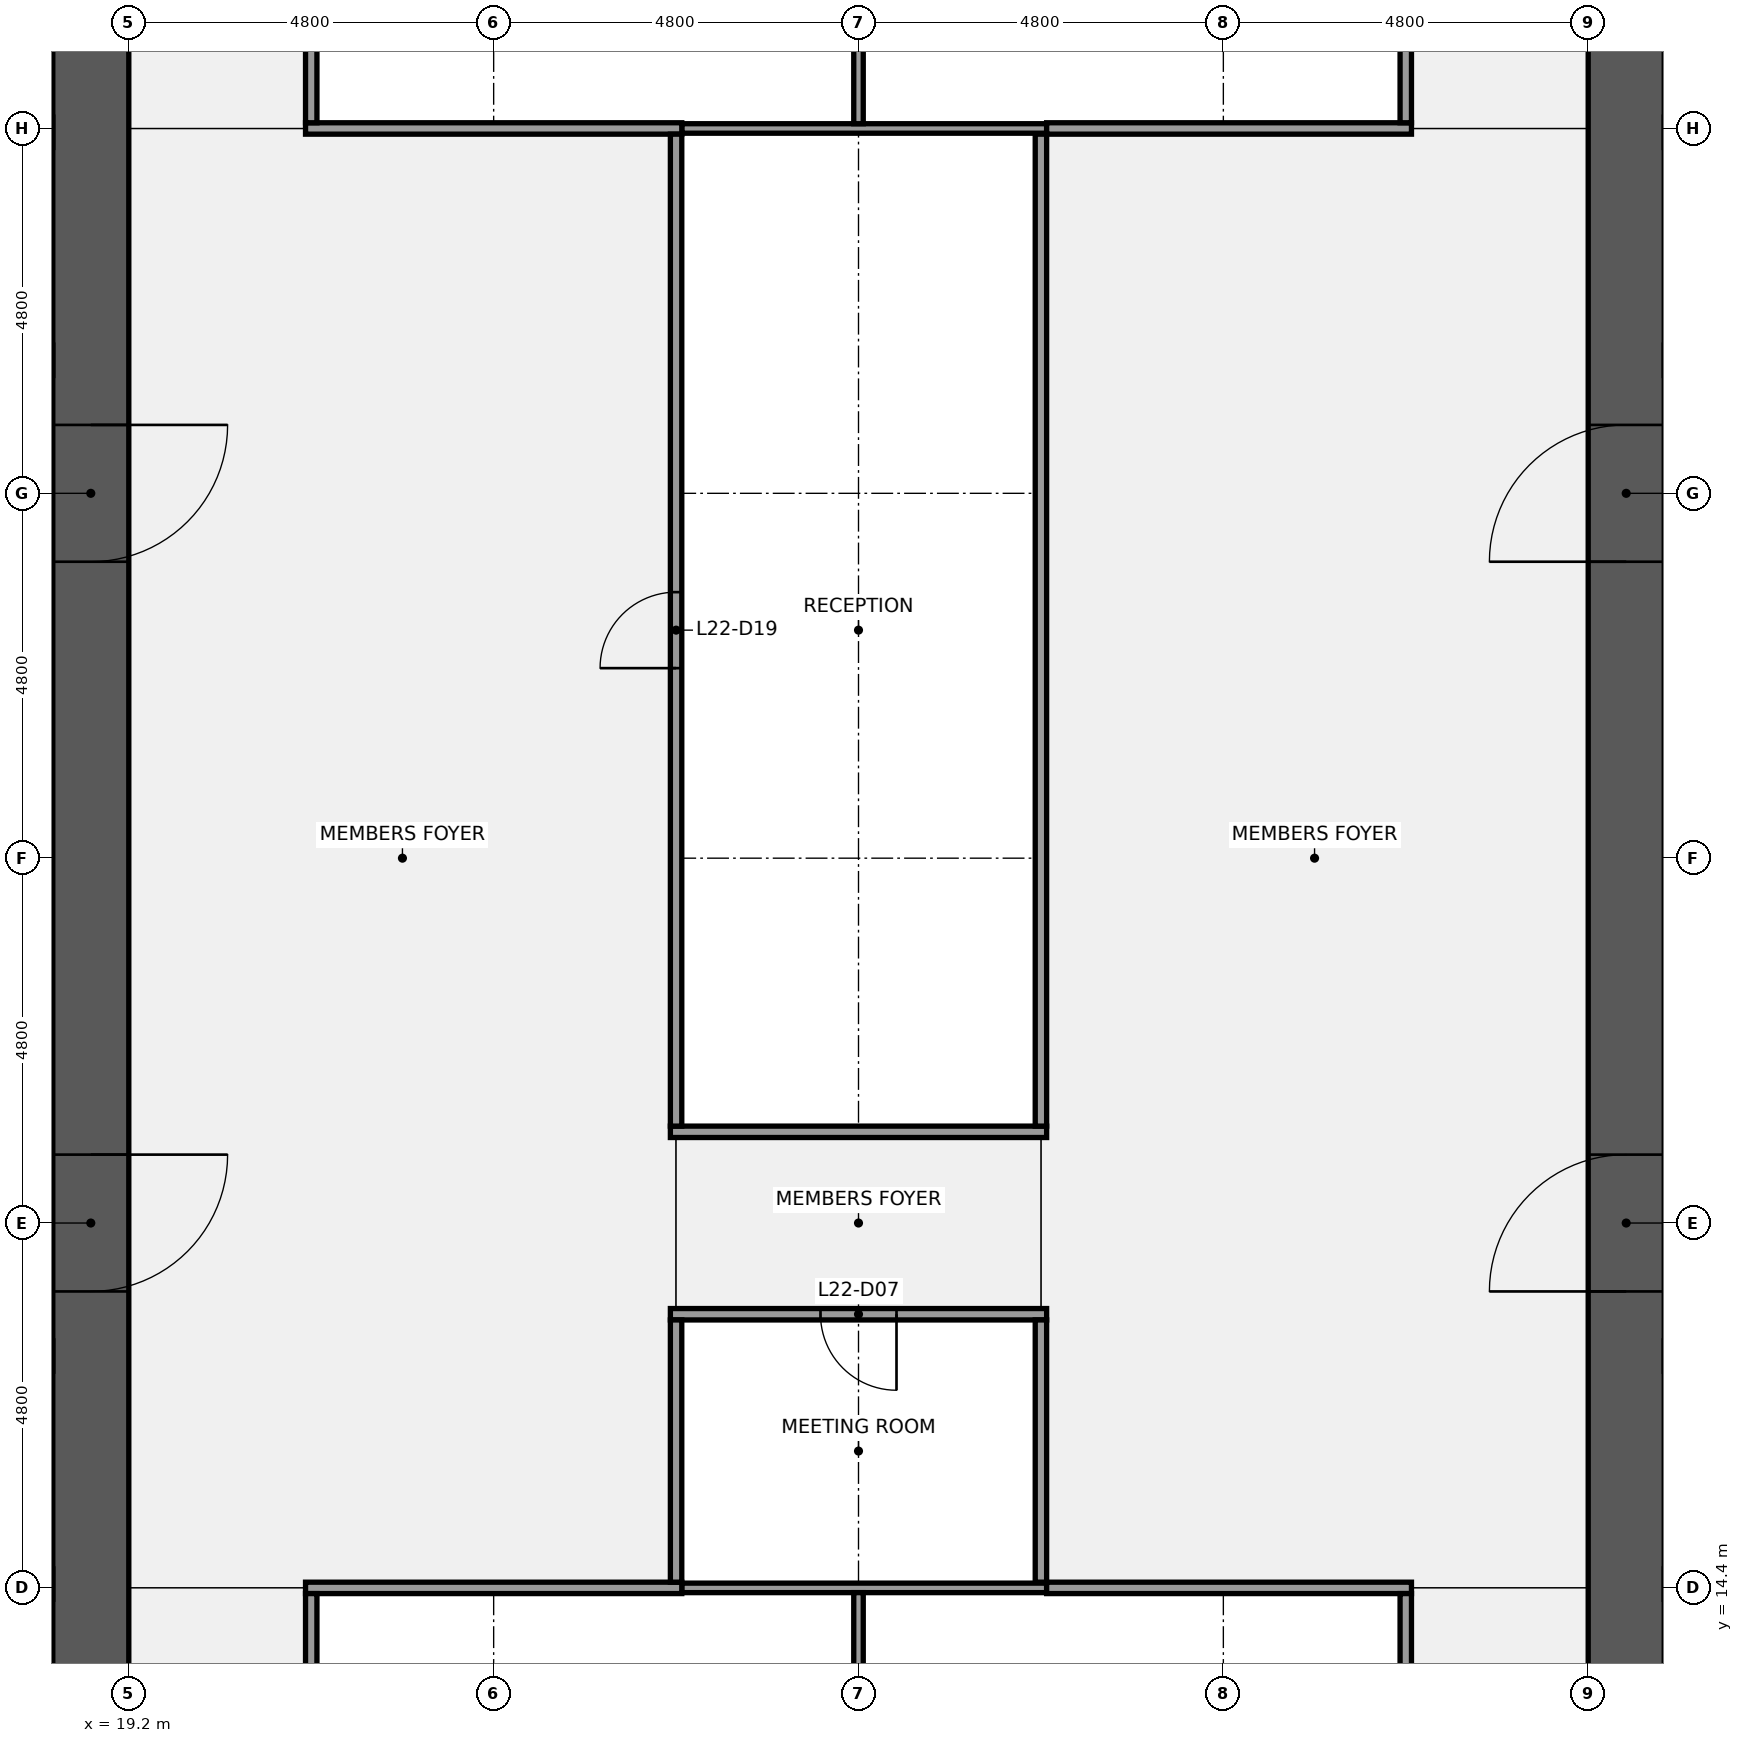
"""IFC4 building model, lengths in metres.
Left out: names, types, materials, properties, quantities, classifications, styles, units other than length and angle.
Written with IfcOpenShell. Run it as: python <this file> out.ifc"""

import sys

from ifc_helpers import new_model, si_unit, direction, frame, frame_2d, origin, place, context, subcontext, project, spatial, rectangle, extrude, element, fill, save


model = new_model("IFC4")
c1 = context("Model", 3, precision=1e-05, world=origin(), true_north=direction((0.0, 1.0)))
c2 = subcontext(c1, "Body", "Model", "MODEL_VIEW")
j1 = project(units=[si_unit("LENGTHUNIT", "METRE"), si_unit("PLANEANGLEUNIT", "RADIAN")], contexts=[c1])
p1 = place(None, origin())
s1 = spatial("IfcSite", under=j1, at=p1, CompositionType="ELEMENT")
p2 = place(p1, origin())
s2 = spatial("IfcBuilding", under=s1, at=p2, CompositionType="ELEMENT")
p3 = place(p2, frame((0.0, 0.0, 108.1)))
s3 = spatial("IfcBuildingStorey", under=s2, at=p3, CompositionType="ELEMENT", Elevation=108.1)
p4 = place(p3, frame((18.7, 38.4, 0.0), z_axis=(0.0, 0.0, 1.0), x_axis=(0.0, -1.0, 0.0)))
e1 = element("IfcWall", 1, at=p4, inside=s3, PredefinedType="SHEAR", context=c2, shape_type="SweptSolid", body=[
    extrude(rectangle(XDim=28.8, YDim=1.0, at=frame_2d((14.4, 0.0))), origin(), (0.0, 0.0, 1.0), 3.84),
])
p5 = place(p4, frame((18.3, 0.0, 0.0)))
e2 = element("IfcOpeningElement", 2, at=p5, cuts=e1, PredefinedType="OPENING", context=c2, shape_type="SweptSolid", body=[
    extrude(rectangle(XDim=1.8, YDim=2.1, at=frame_2d((0.9, 1.05))), frame((0.0, 0.51, 0.0), z_axis=(0.0, -1.0, 0.0), x_axis=(1.0, 0.0, 0.0)), (0.0, 0.0, 1.0), 1.02),
])
p6 = place(p4, frame((8.7, 0.0, 0.0)))
e3 = element("IfcOpeningElement", 3, at=p6, cuts=e1, PredefinedType="OPENING", context=c2, shape_type="SweptSolid", body=[
    extrude(rectangle(XDim=1.8, YDim=2.1, at=frame_2d((0.9, 1.05))), frame((0.0, 0.51, 0.0), z_axis=(0.0, -1.0, 0.0), x_axis=(1.0, 0.0, 0.0)), (0.0, 0.0, 1.0), 1.02),
])
p7 = place(p3, frame((1.0, 14.45, 0.0), z_axis=(0.0, 0.0, 1.0), x_axis=(1.0, 0.0, 0.0)))
e4 = element("IfcWall", 4, at=p7, inside=s3, PredefinedType="SHEAR", context=c2, shape_type="SweptSolid", body=[
    extrude(rectangle(XDim=17.2, YDim=0.4, at=frame_2d((8.6, 0.0))), origin(), (0.0, 0.0, 1.0), 3.84),
])
p8 = place(p3, frame((1.0, 17.45, 0.0), z_axis=(0.0, 0.0, 1.0), x_axis=(1.0, 0.0, 0.0)))
e5 = element("IfcWall", 5, at=p8, inside=s3, PredefinedType="SHEAR", context=c2, shape_type="SweptSolid", body=[
    extrude(rectangle(XDim=17.2, YDim=0.4, at=frame_2d((8.6, 0.0))), origin(), (0.0, 0.0, 1.0), 3.84),
])
p9 = place(p8, frame((1.663, 0.0, 0.0)))
e6 = element("IfcOpeningElement", 6, at=p9, cuts=e5, PredefinedType="OPENING", context=c2, shape_type="SweptSolid", body=[
    extrude(rectangle(XDim=1.0, YDim=2.1, at=frame_2d((0.5, 1.05))), frame((0.0, 0.21, 0.0), z_axis=(0.0, -1.0, 0.0), x_axis=(1.0, 0.0, 0.0)), (0.0, 0.0, 1.0), 0.42),
])
p10 = place(p8, frame((5.7, 0.0, 0.0)))
e7 = element("IfcOpeningElement", 7, at=p10, cuts=e5, PredefinedType="OPENING", context=c2, shape_type="SweptSolid", body=[
    extrude(rectangle(XDim=1.0, YDim=2.1, at=frame_2d((0.5, 1.05))), frame((0.0, 0.21, 0.0), z_axis=(0.0, -1.0, 0.0), x_axis=(1.0, 0.0, 0.0)), (0.0, 0.0, 1.0), 0.42),
])
p11 = place(p8, frame((9.0, 0.0, 0.0)))
e8 = element("IfcOpeningElement", 8, at=p11, cuts=e5, PredefinedType="OPENING", context=c2, shape_type="SweptSolid", body=[
    extrude(rectangle(XDim=1.0, YDim=2.1, at=frame_2d((0.5, 1.05))), frame((0.0, 0.21, 0.0), z_axis=(0.0, -1.0, 0.0), x_axis=(1.0, 0.0, 0.0)), (0.0, 0.0, 1.0), 0.42),
])
p12 = place(p8, frame((11.7, 0.0, 0.0)))
e9 = element("IfcOpeningElement", 9, at=p12, cuts=e5, PredefinedType="OPENING", context=c2, shape_type="SweptSolid", body=[
    extrude(rectangle(XDim=1.0, YDim=2.1, at=frame_2d((0.5, 1.05))), frame((0.0, 0.21, 0.0), z_axis=(0.0, -1.0, 0.0), x_axis=(1.0, 0.0, 0.0)), (0.0, 0.0, 1.0), 0.42),
])
p13 = place(p8, frame((14.837, 0.0, 0.0)))
e10 = element("IfcOpeningElement", 10, at=p13, cuts=e5, PredefinedType="OPENING", context=c2, shape_type="SweptSolid", body=[
    extrude(rectangle(XDim=1.0, YDim=2.1, at=frame_2d((0.5, 1.05))), frame((0.0, 0.21, 0.0), z_axis=(0.0, -1.0, 0.0), x_axis=(1.0, 0.0, 0.0)), (0.0, 0.0, 1.0), 0.42),
])
p14 = place(p3, frame((1.0, 30.55, 0.0), z_axis=(0.0, 0.0, 1.0), x_axis=(1.0, 0.0, 0.0)))
e11 = element("IfcWall", 11, at=p14, inside=s3, PredefinedType="SHEAR", context=c2, shape_type="SweptSolid", body=[
    extrude(rectangle(XDim=17.2, YDim=0.4, at=frame_2d((8.6, 0.0))), origin(), (0.0, 0.0, 1.0), 3.84),
])
p15 = place(p14, frame((0.762, 0.0, 0.0)))
e12 = element("IfcOpeningElement", 12, at=p15, cuts=e11, PredefinedType="OPENING", context=c2, shape_type="SweptSolid", body=[
    extrude(rectangle(XDim=1.0, YDim=2.1, at=frame_2d((0.5, 1.05))), frame((0.0, 0.21, 0.0), z_axis=(0.0, -1.0, 0.0), x_axis=(1.0, 0.0, 0.0)), (0.0, 0.0, 1.0), 0.42),
])
p16 = place(p14, frame((3.6, 0.0, 0.0)))
e13 = element("IfcOpeningElement", 13, at=p16, cuts=e11, PredefinedType="OPENING", context=c2, shape_type="SweptSolid", body=[
    extrude(rectangle(XDim=1.0, YDim=2.1, at=frame_2d((0.5, 1.05))), frame((0.0, 0.21, 0.0), z_axis=(0.0, -1.0, 0.0), x_axis=(1.0, 0.0, 0.0)), (0.0, 0.0, 1.0), 0.42),
])
p17 = place(p14, frame((6.6, 0.0, 0.0)))
e14 = element("IfcOpeningElement", 14, at=p17, cuts=e11, PredefinedType="OPENING", context=c2, shape_type="SweptSolid", body=[
    extrude(rectangle(XDim=1.0, YDim=2.1, at=frame_2d((0.5, 1.05))), frame((0.0, 0.21, 0.0), z_axis=(0.0, -1.0, 0.0), x_axis=(1.0, 0.0, 0.0)), (0.0, 0.0, 1.0), 0.42),
])
p18 = place(p14, frame((10.2, 0.0, 0.0)))
e15 = element("IfcOpeningElement", 15, at=p18, cuts=e11, PredefinedType="OPENING", context=c2, shape_type="SweptSolid", body=[
    extrude(rectangle(XDim=1.0, YDim=2.1, at=frame_2d((0.5, 1.05))), frame((0.0, 0.21, 0.0), z_axis=(0.0, -1.0, 0.0), x_axis=(1.0, 0.0, 0.0)), (0.0, 0.0, 1.0), 0.42),
])
p19 = place(p14, frame((14.538, 0.0, 0.0)))
e16 = element("IfcOpeningElement", 16, at=p19, cuts=e11, PredefinedType="OPENING", context=c2, shape_type="SweptSolid", body=[
    extrude(rectangle(XDim=1.0, YDim=2.1, at=frame_2d((0.5, 1.05))), frame((0.0, 0.21, 0.0), z_axis=(0.0, -1.0, 0.0), x_axis=(1.0, 0.0, 0.0)), (0.0, 0.0, 1.0), 0.42),
])
p20 = place(p3, frame((1.0, 33.55, 0.0), z_axis=(0.0, 0.0, 1.0), x_axis=(1.0, 0.0, 0.0)))
e17 = element("IfcWall", 17, at=p20, inside=s3, PredefinedType="SHEAR", context=c2, shape_type="SweptSolid", body=[
    extrude(rectangle(XDim=17.2, YDim=0.4, at=frame_2d((8.6, 0.0))), origin(), (0.0, 0.0, 1.0), 3.84),
])
p21 = place(p3, frame((38.9, 9.6, 0.0), z_axis=(0.0, 0.0, 1.0), x_axis=(0.0, 1.0, 0.0)))
e18 = element("IfcWall", 18, at=p21, inside=s3, PredefinedType="SHEAR", context=c2, shape_type="SweptSolid", body=[
    extrude(rectangle(XDim=28.8, YDim=1.0, at=frame_2d((14.4, 0.0))), origin(), (0.0, 0.0, 1.0), 3.84),
])
p22 = place(p21, frame((8.7, 0.0, 0.0)))
e19 = element("IfcOpeningElement", 19, at=p22, cuts=e18, PredefinedType="OPENING", context=c2, shape_type="SweptSolid", body=[
    extrude(rectangle(XDim=1.8, YDim=2.1, at=frame_2d((0.9, 1.05))), frame((0.0, 0.51, 0.0), z_axis=(0.0, -1.0, 0.0), x_axis=(1.0, 0.0, 0.0)), (0.0, 0.0, 1.0), 1.02),
])
p23 = place(p21, frame((18.3, 0.0, 0.0)))
e20 = element("IfcOpeningElement", 20, at=p23, cuts=e18, PredefinedType="OPENING", context=c2, shape_type="SweptSolid", body=[
    extrude(rectangle(XDim=1.8, YDim=2.1, at=frame_2d((0.9, 1.05))), frame((0.0, 0.51, 0.0), z_axis=(0.0, -1.0, 0.0), x_axis=(1.0, 0.0, 0.0)), (0.0, 0.0, 1.0), 1.02),
])
p24 = place(p3, frame((26.475, 14.4, 0.0), z_axis=(0.0, 0.0, 1.0), x_axis=(1.0, 0.0, 0.0)))
e21 = element("IfcWall", 21, at=p24, inside=s3, PredefinedType="PARTITIONING", context=c2, shape_type="SweptSolid", body=[
    extrude(rectangle(XDim=4.8, YDim=0.125, at=frame_2d((2.4, 0.0))), origin(), (0.0, 0.0, 1.0), 2.936),
])
p25 = place(p3, frame((21.525, 14.4, 0.0), z_axis=(0.0, 0.0, 1.0), x_axis=(1.0, 0.0, 0.0)))
e22 = element("IfcWall", 22, at=p25, inside=s3, PredefinedType="PARTITIONING", context=c2, shape_type="SweptSolid", body=[
    extrude(rectangle(XDim=4.95, YDim=0.15, at=frame_2d((2.475, 0.0))), origin(), (0.0, 0.0, 1.0), 2.936),
])
p26 = place(p3, frame((31.275, 14.4, 0.0), z_axis=(0.0, 0.0, 1.0), x_axis=(1.0, 0.0, 0.0)))
e23 = element("IfcWall", 23, at=p26, inside=s3, PredefinedType="PARTITIONING", context=c2, shape_type="SweptSolid", body=[
    extrude(rectangle(XDim=4.8, YDim=0.15, at=frame_2d((2.4, 0.0))), origin(), (0.0, 0.0, 1.0), 2.936),
])
p27 = place(p3, frame((26.325, 18.0, 0.0), z_axis=(0.0, 0.0, 1.0), x_axis=(1.0, 0.0, 0.0)))
e24 = element("IfcWall", 24, at=p27, inside=s3, PredefinedType="PARTITIONING", context=c2, shape_type="SweptSolid", body=[
    extrude(rectangle(XDim=4.95, YDim=0.15, at=frame_2d((2.475, 0.0))), origin(), (0.0, 0.0, 1.0), 2.936),
])
p28 = place(p27, frame((1.975, 0.0, 0.0)))
e25 = element("IfcOpeningElement", 25, at=p28, cuts=e24, PredefinedType="OPENING", context=c2, shape_type="SweptSolid", body=[
    extrude(rectangle(XDim=1.0, YDim=2.1, at=frame_2d((0.5, 1.05))), frame((0.0, 0.085, 0.0), z_axis=(0.0, -1.0, 0.0), x_axis=(1.0, 0.0, 0.0)), (0.0, 0.0, 1.0), 0.17),
])
p29 = place(p3, frame((26.325, 20.4, 0.0), z_axis=(0.0, 0.0, 1.0), x_axis=(1.0, 0.0, 0.0)))
e26 = element("IfcWall", 26, at=p29, inside=s3, PredefinedType="PARTITIONING", context=c2, shape_type="SweptSolid", body=[
    extrude(rectangle(XDim=4.95, YDim=0.15, at=frame_2d((2.475, 0.0))), origin(), (0.0, 0.0, 1.0), 2.936),
])
p30 = place(p3, frame((26.475, 33.6, 0.0), z_axis=(0.0, 0.0, 1.0), x_axis=(1.0, 0.0, 0.0)))
e27 = element("IfcWall", 27, at=p30, inside=s3, PredefinedType="PARTITIONING", context=c2, shape_type="SweptSolid", body=[
    extrude(rectangle(XDim=4.8, YDim=0.125, at=frame_2d((2.4, 0.0))), origin(), (0.0, 0.0, 1.0), 2.936),
])
p31 = place(p3, frame((21.525, 33.6, 0.0), z_axis=(0.0, 0.0, 1.0), x_axis=(1.0, 0.0, 0.0)))
e28 = element("IfcWall", 28, at=p31, inside=s3, PredefinedType="PARTITIONING", context=c2, shape_type="SweptSolid", body=[
    extrude(rectangle(XDim=4.95, YDim=0.15, at=frame_2d((2.475, 0.0))), origin(), (0.0, 0.0, 1.0), 2.936),
])
p32 = place(p3, frame((31.275, 33.6, 0.0), z_axis=(0.0, 0.0, 1.0), x_axis=(1.0, 0.0, 0.0)))
e29 = element("IfcWall", 29, at=p32, inside=s3, PredefinedType="PARTITIONING", context=c2, shape_type="SweptSolid", body=[
    extrude(rectangle(XDim=4.8, YDim=0.15, at=frame_2d((2.4, 0.0))), origin(), (0.0, 0.0, 1.0), 2.936),
])
for number, where, z_axis, x_axis in (
    (30, (21.6, 9.675, 0.0), (0.0, 0.0, 1.0), (0.0, 1.0, 0.0)),
    (31, (21.6, 33.675, 0.0), (0.0, 0.0, 1.0), (0.0, 1.0, 0.0)),
):
    element("IfcWall", number, at=place(p3, frame(where, z_axis=z_axis, x_axis=x_axis)), inside=s3, PredefinedType="PARTITIONING", context=c2, shape_type="SweptSolid", body=[
        extrude(rectangle(XDim=4.65, YDim=0.15, at=frame_2d((2.325, 0.0))), origin(), (0.0, 0.0, 1.0), 2.936),
    ])
p33 = place(p3, frame((26.4, 14.475, 0.0), z_axis=(0.0, 0.0, 1.0), x_axis=(0.0, 1.0, 0.0)))
e32 = element("IfcWall", 32, at=p33, inside=s3, PredefinedType="PARTITIONING", context=c2, shape_type="SweptSolid", body=[
    extrude(rectangle(XDim=3.45, YDim=0.15, at=frame_2d((1.725, 0.0))), origin(), (0.0, 0.0, 1.0), 2.936),
])
p34 = place(p3, frame((26.4, 20.475, 0.0), z_axis=(0.0, 0.0, 1.0), x_axis=(0.0, 1.0, 0.0)))
e33 = element("IfcWall", 33, at=p34, inside=s3, PredefinedType="PARTITIONING", context=c2, shape_type="SweptSolid", body=[
    extrude(rectangle(XDim=13.05, YDim=0.15, at=frame_2d((6.525, 0.0))), origin(), (0.0, 0.0, 1.0), 2.936),
])
p35 = place(p34, frame((6.025, 0.0, 0.0)))
e34 = element("IfcOpeningElement", 34, at=p35, cuts=e33, PredefinedType="OPENING", context=c2, shape_type="SweptSolid", body=[
    extrude(rectangle(XDim=1.0, YDim=2.1, at=frame_2d((0.5, 1.05))), frame((0.0, 0.085, 0.0), z_axis=(0.0, -1.0, 0.0), x_axis=(1.0, 0.0, 0.0)), (0.0, 0.0, 1.0), 0.17),
])
for number, where, z_axis, x_axis in (
    (35, (28.8, 9.675, 0.0), (0.0, 0.0, 1.0), (0.0, 1.0, 0.0)),
    (36, (28.8, 33.663, 0.0), (0.0, 0.0, 1.0), (0.0, 1.0, 0.0)),
):
    element("IfcWall", number, at=place(p3, frame(where, z_axis=z_axis, x_axis=x_axis)), inside=s3, PredefinedType="PARTITIONING", context=c2, shape_type="SweptSolid", body=[
        extrude(rectangle(XDim=4.662, YDim=0.125, at=frame_2d((2.331, 0.0))), origin(), (0.0, 0.0, 1.0), 2.936),
    ])
p36 = place(p3, frame((31.2, 14.475, 0.0), z_axis=(0.0, 0.0, 1.0), x_axis=(0.0, 1.0, 0.0)))
e37 = element("IfcWall", 37, at=p36, inside=s3, PredefinedType="PARTITIONING", context=c2, shape_type="SweptSolid", body=[
    extrude(rectangle(XDim=3.45, YDim=0.15, at=frame_2d((1.725, 0.0))), origin(), (0.0, 0.0, 1.0), 2.936),
])
p37 = place(p3, frame((31.2, 20.475, 0.0), z_axis=(0.0, 0.0, 1.0), x_axis=(0.0, 1.0, 0.0)))
e38 = element("IfcWall", 38, at=p37, inside=s3, PredefinedType="PARTITIONING", context=c2, shape_type="SweptSolid", body=[
    extrude(rectangle(XDim=13.05, YDim=0.15, at=frame_2d((6.525, 0.0))), origin(), (0.0, 0.0, 1.0), 2.936),
])
for number, where, z_axis, x_axis in (
    (39, (36.0, 9.675, 0.0), (0.0, 0.0, 1.0), (0.0, 1.0, 0.0)),
    (40, (36.0, 33.675, 0.0), (0.0, 0.0, 1.0), (0.0, 1.0, 0.0)),
):
    element("IfcWall", number, at=place(p3, frame(where, z_axis=z_axis, x_axis=x_axis)), inside=s3, PredefinedType="PARTITIONING", context=c2, shape_type="SweptSolid", body=[
        extrude(rectangle(XDim=4.65, YDim=0.15, at=frame_2d((2.325, 0.0))), origin(), (0.0, 0.0, 1.0), 2.936),
    ])
p38 = place(p5, origin())
e41 = element("IfcDoor", 41, at=p38, inside=s3, OperationType="DOUBLE_DOOR_SINGLE_SWING", PredefinedType="DOOR", context=c2, shape_type="SweptSolid", body=[
    extrude(rectangle(XDim=1.8, YDim=2.1, at=frame_2d((0.9, 1.05))), frame((0.0, 0.025, 0.0), z_axis=(0.0, -1.0, 0.0), x_axis=(1.0, 0.0, 0.0)), (0.0, 0.0, 1.0), 0.05),
])
fill(e2, e41)
p39 = place(p6, origin())
e42 = element("IfcDoor", 42, at=p39, inside=s3, OperationType="DOUBLE_DOOR_SINGLE_SWING", PredefinedType="DOOR", context=c2, shape_type="SweptSolid", body=[
    extrude(rectangle(XDim=1.8, YDim=2.1, at=frame_2d((0.9, 1.05))), frame((0.0, 0.025, 0.0), z_axis=(0.0, -1.0, 0.0), x_axis=(1.0, 0.0, 0.0)), (0.0, 0.0, 1.0), 0.05),
])
fill(e3, e42)
p40 = place(p22, origin())
e43 = element("IfcDoor", 43, at=p40, inside=s3, OperationType="DOUBLE_DOOR_SINGLE_SWING", PredefinedType="DOOR", context=c2, shape_type="SweptSolid", body=[
    extrude(rectangle(XDim=1.8, YDim=2.1, at=frame_2d((0.9, 1.05))), frame((0.0, 0.025, 0.0), z_axis=(0.0, -1.0, 0.0), x_axis=(1.0, 0.0, 0.0)), (0.0, 0.0, 1.0), 0.05),
])
fill(e19, e43)
p41 = place(p23, origin())
e44 = element("IfcDoor", 44, at=p41, inside=s3, OperationType="DOUBLE_DOOR_SINGLE_SWING", PredefinedType="DOOR", context=c2, shape_type="SweptSolid", body=[
    extrude(rectangle(XDim=1.8, YDim=2.1, at=frame_2d((0.9, 1.05))), frame((0.0, 0.025, 0.0), z_axis=(0.0, -1.0, 0.0), x_axis=(1.0, 0.0, 0.0)), (0.0, 0.0, 1.0), 0.05),
])
fill(e20, e44)
p42 = place(p28, origin())
e45 = element("IfcDoor", 45, at=p42, inside=s3, OperationType="SINGLE_SWING_RIGHT", PredefinedType="DOOR", context=c2, shape_type="SweptSolid", body=[
    extrude(rectangle(XDim=1.0, YDim=2.1, at=frame_2d((0.5, 1.05))), frame((0.0, 0.025, 0.0), z_axis=(0.0, -1.0, 0.0), x_axis=(1.0, 0.0, 0.0)), (0.0, 0.0, 1.0), 0.05),
])
fill(e25, e45)
p43 = place(p35, origin())
e46 = element("IfcDoor", 46, at=p43, inside=s3, OperationType="SINGLE_SWING_LEFT", PredefinedType="DOOR", context=c2, shape_type="SweptSolid", body=[
    extrude(rectangle(XDim=1.0, YDim=2.1, at=frame_2d((0.5, 1.05))), frame((0.0, 0.025, 0.0), z_axis=(0.0, -1.0, 0.0), x_axis=(1.0, 0.0, 0.0)), (0.0, 0.0, 1.0), 0.05),
])
fill(e34, e46)
save(model, sys.argv[1])
